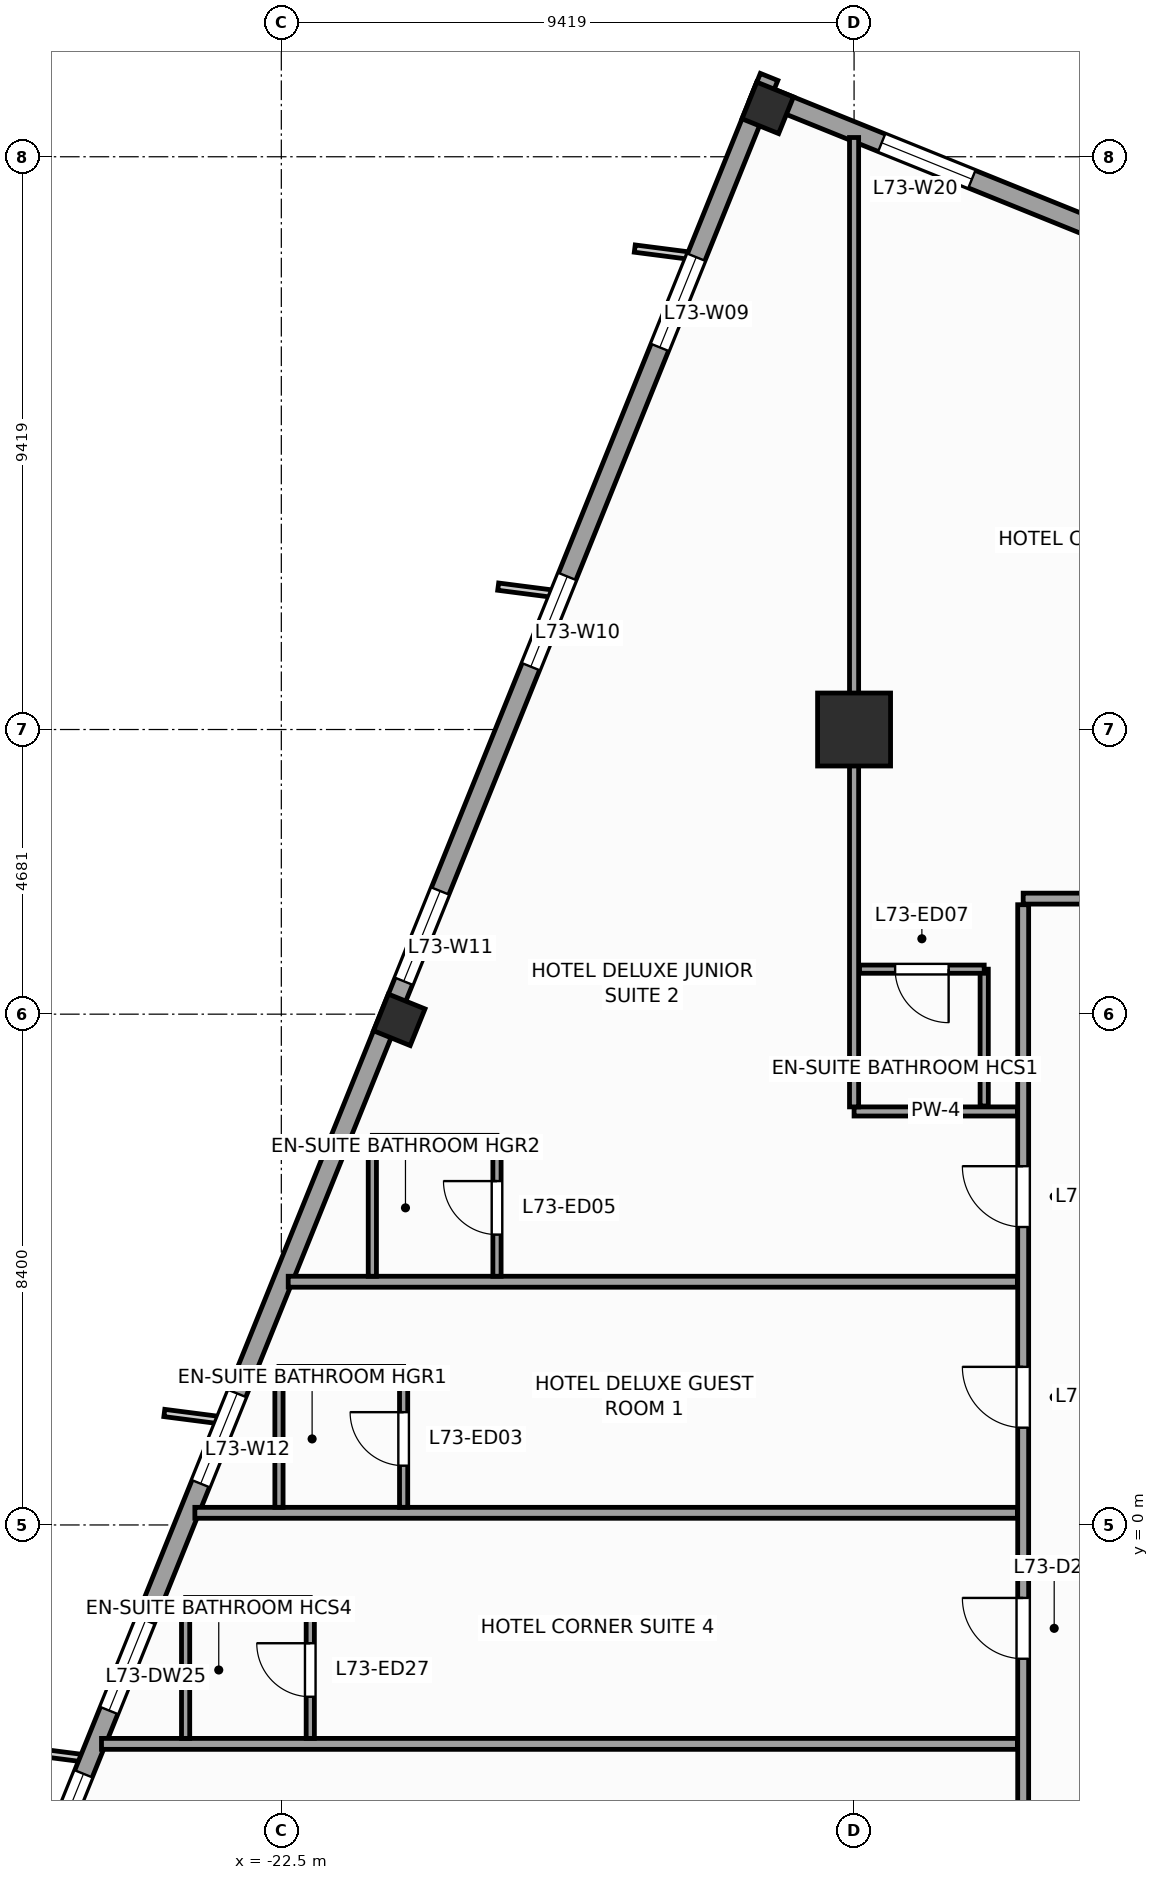
"""IFC4 building model, lengths in metres.
Left out: names, types, materials, properties, quantities, classifications, styles, units other than length and angle.
Written with IfcOpenShell. Run it as: python <this file> out.ifc"""

import sys

from ifc_helpers import new_model, si_unit, direction, frame, frame_2d, origin, origin_2d, place, context, subcontext, project, spatial, rectangle, extrude, source, transform, mapped, element, fill, save


model = new_model("IFC4")
c1 = context("Model", 3, precision=1e-05, world=origin(), true_north=direction((0.0, 1.0)))
c2 = subcontext(c1, "Body", "Model", "MODEL_VIEW")
j1 = project(units=[si_unit("LENGTHUNIT", "METRE"), si_unit("PLANEANGLEUNIT", "RADIAN")], contexts=[c1])
p1 = place(None, origin())
s1 = spatial("IfcSite", under=j1, at=p1, CompositionType="ELEMENT")
p2 = place(p1, origin())
s2 = spatial("IfcBuilding", under=s1, at=p2, CompositionType="ELEMENT")
p3 = place(p2, frame((0.0, 0.0, 297.6)))
s3 = spatial("IfcBuildingStorey", under=s2, at=p3, CompositionType="ELEMENT", Elevation=297.6)
m1 = source(origin(), c2, "Body", "SweptSolid", [
    extrude(rectangle(XDim=1.2, YDim=1.2, at=origin_2d()), origin(), (0.0, 0.0, 1.0), 3.6),
])
p4 = place(p3, frame((-13.081, 13.081, 0.0), z_axis=(0.0, 0.0, 1.0), x_axis=(1.0, 0.0, 0.0)))
e1 = element("IfcColumn", 1, at=p4, inside=s3, PredefinedType="COLUMN", context=c2, shape_type="MappedRepresentation", body=[
    mapped(m1, transform((0.0, 0.0, 0.0), scale=1.0)),
])
m2 = source(origin(), c2, "Body", "SweptSolid", [
    extrude(rectangle(XDim=0.65, YDim=0.65, at=origin_2d()), origin(), (0.0, 0.0, 1.0), 3.6),
])
for number, where, z_axis, x_axis in (
    (2, (-14.501, 23.304, 0.0), (0.0, 0.0, 1.0), (0.375, 0.927, 0.0)),
    (3, (-20.56, 8.307, 0.0), (0.0, 0.0, 1.0), (0.375, 0.927, 0.0)),
):
    element("IfcColumn", number, at=place(p3, frame(where, z_axis=z_axis, x_axis=x_axis)), inside=s3, PredefinedType="COLUMN", context=c2, shape_type="MappedRepresentation", body=[
        mapped(m2, transform((0.0, 0.0, 0.0), scale=1.0)),
    ])
p5 = place(p3, frame((-9.032, 21.278, 0.0), z_axis=(0.0, 0.0, 1.0), x_axis=(-0.927185411764, 0.374602739196, 0.0)))
e4 = element("IfcWall", 4, at=p5, inside=s3, PredefinedType="STANDARD", context=c2, shape_type="SweptSolid", body=[
    extrude(rectangle(XDim=6.155, YDim=0.31, at=frame_2d((3.078, 0.0))), origin(), (0.0, 0.0, 1.0), 3.35),
])
p6 = place(p5, frame((2.278, 0.0, 0.47)))
e5 = element("IfcOpeningElement", 5, at=p6, cuts=e4, PredefinedType="OPENING", context=c2, shape_type="SweptSolid", body=[
    extrude(rectangle(XDim=1.6, YDim=2.1, at=frame_2d((0.8, 1.05))), frame((0.0, 0.165, 0.0), z_axis=(0.0, -1.0, 0.0), x_axis=(1.0, 0.0, 0.0)), (0.0, 0.0, 1.0), 0.33),
])
p7 = place(p3, frame((-14.479, 23.813, 0.0), z_axis=(0.0, 0.0, 1.0), x_axis=(-0.374609557019, -0.927182657188, 0.0)))
e6 = element("IfcWall", 6, at=p7, inside=s3, PredefinedType="STANDARD", context=c2, shape_type="SweptSolid", body=[
    extrude(rectangle(XDim=33.31, YDim=0.31, at=frame_2d((16.655, 0.0))), origin(), (0.0, 0.0, 1.0), 2.75),
])
p8 = place(p7, frame((3.197, 0.0, 0.47)))
e7 = element("IfcOpeningElement", 7, at=p8, cuts=e6, PredefinedType="OPENING", context=c2, shape_type="SweptSolid", body=[
    extrude(rectangle(XDim=1.6, YDim=2.1, at=frame_2d((0.8, 1.05))), frame((0.0, 0.165, 0.0), z_axis=(0.0, -1.0, 0.0), x_axis=(1.0, 0.0, 0.0)), (0.0, 0.0, 1.0), 0.33),
])
p9 = place(p7, frame((8.86, 0.0, 0.47)))
e8 = element("IfcOpeningElement", 8, at=p9, cuts=e6, PredefinedType="OPENING", context=c2, shape_type="SweptSolid", body=[
    extrude(rectangle(XDim=1.6, YDim=2.1, at=frame_2d((0.8, 1.05))), frame((0.0, 0.165, 0.0), z_axis=(0.0, -1.0, 0.0), x_axis=(1.0, 0.0, 0.0)), (0.0, 0.0, 1.0), 0.33),
])
p10 = place(p7, frame((14.439, 0.0, 0.47)))
e9 = element("IfcOpeningElement", 9, at=p10, cuts=e6, PredefinedType="OPENING", context=c2, shape_type="SweptSolid", body=[
    extrude(rectangle(XDim=1.6, YDim=2.1, at=frame_2d((0.8, 1.05))), frame((0.0, 0.165, 0.0), z_axis=(0.0, -1.0, 0.0), x_axis=(1.0, 0.0, 0.0)), (0.0, 0.0, 1.0), 0.33),
])
p11 = place(p7, frame((23.351, 0.0, 0.47)))
e10 = element("IfcOpeningElement", 10, at=p11, cuts=e6, PredefinedType="OPENING", context=c2, shape_type="SweptSolid", body=[
    extrude(rectangle(XDim=1.6, YDim=2.1, at=frame_2d((0.8, 1.05))), frame((0.0, 0.165, 0.0), z_axis=(0.0, -1.0, 0.0), x_axis=(1.0, 0.0, 0.0)), (0.0, 0.0, 1.0), 0.33),
])
p12 = place(p7, frame((30.097, 0.0, 0.47)))
e11 = element("IfcOpeningElement", 11, at=p12, cuts=e6, PredefinedType="OPENING", context=c2, shape_type="SweptSolid", body=[
    extrude(rectangle(XDim=1.6, YDim=2.1, at=frame_2d((0.8, 1.05))), frame((0.0, 0.165, 0.0), z_axis=(0.0, -1.0, 0.0), x_axis=(1.0, 0.0, 0.0)), (0.0, 0.0, 1.0), 0.33),
])
p13 = place(p7, frame((27.374, 0.0, 0.47)))
e12 = element("IfcOpeningElement", 12, at=p13, cuts=e6, PredefinedType="OPENING", context=c2, shape_type="SweptSolid", body=[
    extrude(rectangle(XDim=1.6, YDim=2.1, at=frame_2d((0.8, 1.05))), frame((0.0, 0.165, 0.0), z_axis=(0.0, -1.0, 0.0), x_axis=(1.0, 0.0, 0.0)), (0.0, 0.0, 1.0), 0.33),
])
p14 = place(p3, frame((-10.3, 10.3, 0.0), z_axis=(0.0, 0.0, 1.0), x_axis=(1.0, 0.0, 0.0)))
e13 = element("IfcWall", 13, at=p14, inside=s3, PredefinedType="PARTITIONING", context=c2, shape_type="SweptSolid", body=[
    extrude(rectangle(XDim=21.65, YDim=0.18, at=frame_2d((10.825, 0.0))), origin(), (0.0, 0.0, 1.0), 3.35),
])
p15 = place(p14, frame((2.564, 0.0, 0.0)))
e14 = element("IfcOpeningElement", 14, at=p15, cuts=e13, PredefinedType="OPENING", context=c2, shape_type="SweptSolid", body=[
    extrude(rectangle(XDim=1.0, YDim=2.15, at=frame_2d((0.5, 1.075))), frame((0.0, 0.1, 0.0), z_axis=(0.0, -1.0, 0.0), x_axis=(1.0, 0.0, 0.0)), (0.0, 0.0, 1.0), 0.2),
])
p16 = place(p14, frame((8.05, 0.0, 0.0)))
e15 = element("IfcOpeningElement", 15, at=p16, cuts=e13, PredefinedType="OPENING", context=c2, shape_type="SweptSolid", body=[
    extrude(rectangle(XDim=1.0, YDim=2.15, at=frame_2d((0.5, 1.075))), frame((0.0, 0.1, 0.0), z_axis=(0.0, -1.0, 0.0), x_axis=(1.0, 0.0, 0.0)), (0.0, 0.0, 1.0), 0.2),
])
p17 = place(p14, frame((12.54, 0.0, 0.0)))
e16 = element("IfcOpeningElement", 16, at=p17, cuts=e13, PredefinedType="OPENING", context=c2, shape_type="SweptSolid", body=[
    extrude(rectangle(XDim=1.0, YDim=2.15, at=frame_2d((0.5, 1.075))), frame((0.0, 0.1, 0.0), z_axis=(0.0, -1.0, 0.0), x_axis=(1.0, 0.0, 0.0)), (0.0, 0.0, 1.0), 0.2),
])
p18 = place(p14, frame((18.871, 0.0, 0.0)))
e17 = element("IfcOpeningElement", 17, at=p18, cuts=e13, PredefinedType="OPENING", context=c2, shape_type="SweptSolid", body=[
    extrude(rectangle(XDim=1.0, YDim=2.15, at=frame_2d((0.5, 1.075))), frame((0.0, 0.1, 0.0), z_axis=(0.0, -1.0, 0.0), x_axis=(1.0, 0.0, 0.0)), (0.0, 0.0, 1.0), 0.2),
])
p19 = place(p3, frame((-10.3, -12.35, 0.0), z_axis=(0.0, 0.0, 1.0), x_axis=(0.0, 1.0, 0.0)))
e18 = element("IfcWall", 18, at=p19, inside=s3, PredefinedType="PARTITIONING", context=c2, shape_type="SweptSolid", body=[
    extrude(rectangle(XDim=22.55, YDim=0.18, at=frame_2d((11.275, 0.0))), origin(), (0.0, 0.0, 1.0), 3.35),
])
p20 = place(p19, frame((13.95, 0.0, 0.0)))
e19 = element("IfcOpeningElement", 19, at=p20, cuts=e18, PredefinedType="OPENING", context=c2, shape_type="SweptSolid", body=[
    extrude(rectangle(XDim=1.0, YDim=2.15, at=frame_2d((0.5, 1.075))), frame((0.0, 0.1, 0.0), z_axis=(0.0, -1.0, 0.0), x_axis=(1.0, 0.0, 0.0)), (0.0, 0.0, 1.0), 0.2),
])
p21 = place(p19, frame((17.25, 0.0, 0.0)))
e20 = element("IfcOpeningElement", 20, at=p21, cuts=e18, PredefinedType="OPENING", context=c2, shape_type="SweptSolid", body=[
    extrude(rectangle(XDim=1.0, YDim=2.15, at=frame_2d((0.5, 1.075))), frame((0.0, 0.1, 0.0), z_axis=(0.0, -1.0, 0.0), x_axis=(1.0, 0.0, 0.0)), (0.0, 0.0, 1.0), 0.2),
])
p22 = place(p19, frame((6.65, 0.0, 0.0)))
e21 = element("IfcOpeningElement", 21, at=p22, cuts=e18, PredefinedType="OPENING", context=c2, shape_type="SweptSolid", body=[
    extrude(rectangle(XDim=1.0, YDim=2.15, at=frame_2d((0.5, 1.075))), frame((0.0, 0.1, 0.0), z_axis=(0.0, -1.0, 0.0), x_axis=(1.0, 0.0, 0.0)), (0.0, 0.0, 1.0), 0.2),
])
p23 = place(p19, frame((10.15, 0.0, 0.0)))
e22 = element("IfcOpeningElement", 22, at=p23, cuts=e18, PredefinedType="OPENING", context=c2, shape_type="SweptSolid", body=[
    extrude(rectangle(XDim=1.0, YDim=2.15, at=frame_2d((0.5, 1.075))), frame((0.0, 0.1, 0.0), z_axis=(0.0, -1.0, 0.0), x_axis=(1.0, 0.0, 0.0)), (0.0, 0.0, 1.0), 0.2),
])
p24 = place(p3, frame((-10.395, -3.6, 0.0), z_axis=(0.0, 0.0, 1.0), x_axis=(-1.0, 0.0, 0.0)))
e23 = element("IfcWall", 23, at=p24, inside=s3, PredefinedType="PARTITIONING", context=c2, shape_type="SweptSolid", body=[
    extrude(rectangle(XDim=15.062, YDim=0.18, at=frame_2d((7.531, 0.0))), origin(), (0.0, 0.0, 1.0), 3.02),
])
p25 = place(p3, frame((-10.395, 0.2, 0.0), z_axis=(0.0, 0.0, 1.0), x_axis=(-1.0, 0.0, 0.0)))
e24 = element("IfcWall", 24, at=p25, inside=s3, PredefinedType="PARTITIONING", context=c2, shape_type="SweptSolid", body=[
    extrude(rectangle(XDim=13.527, YDim=0.18, at=frame_2d((6.763, 0.0))), origin(), (0.0, 0.0, 1.0), 3.02),
])
p26 = place(p3, frame((-10.395, 4.0, 0.0), z_axis=(0.0, 0.0, 1.0), x_axis=(-1.0, 0.0, 0.0)))
e25 = element("IfcWall", 25, at=p26, inside=s3, PredefinedType="PARTITIONING", context=c2, shape_type="SweptSolid", body=[
    extrude(rectangle(XDim=11.992, YDim=0.18, at=frame_2d((5.996, 0.0))), origin(), (0.0, 0.0, 1.0), 3.02),
])
p27 = place(p3, frame((-10.395, 6.8, 0.0), z_axis=(0.0, 0.0, 1.0), x_axis=(-1.0, 0.0, 0.0)))
e26 = element("IfcWall", 26, at=p27, inside=s3, PredefinedType="PARTITIONING", context=c2, shape_type="SweptSolid", body=[
    extrude(rectangle(XDim=2.686, YDim=0.15, at=frame_2d((1.343, 0.0))), origin(), (0.0, 0.0, 1.0), 3.35),
])
p28 = place(p3, frame((-13.081, 6.875, 0.0), z_axis=(0.0, 0.0, 1.0), x_axis=(0.0, 1.0, 0.0)))
e27 = element("IfcWall", 27, at=p28, inside=s3, PredefinedType="PARTITIONING", context=c2, shape_type="SweptSolid", body=[
    extrude(rectangle(XDim=15.942, YDim=0.15, at=frame_2d((7.971, 0.0))), origin(), (0.0, 0.0, 1.0), 2.45),
])
p29 = place(p3, frame((-20.489, 0.29, 0.0), z_axis=(0.0, 0.0, 1.0), x_axis=(0.0, 1.0, 0.0)))
e28 = element("IfcWall", 28, at=p29, inside=s3, PredefinedType="PARTITIONING", context=c2, shape_type="SweptSolid", body=[
    extrude(rectangle(XDim=2.25, YDim=0.135, at=frame_2d((1.125, 0.0))), origin(), (0.0, 0.0, 1.0), 3.35),
])
p30 = place(p29, frame((0.685, 0.0, 0.0)))
e29 = element("IfcOpeningElement", 29, at=p30, cuts=e28, PredefinedType="OPENING", context=c2, shape_type="SweptSolid", body=[
    extrude(rectangle(XDim=0.88, YDim=2.1, at=frame_2d((0.44, 1.05))), frame((0.0, 0.078, 0.0), z_axis=(0.0, -1.0, 0.0), x_axis=(1.0, 0.0, 0.0)), (0.0, 0.0, 1.0), 0.155),
])
p31 = place(p3, frame((-22.539, 2.54, 0.0), z_axis=(0.0, 0.0, 1.0), x_axis=(1.0, 0.0, 0.0)))
e30 = element("IfcWall", 30, at=p31, inside=s3, PredefinedType="PARTITIONING", context=c2, shape_type="SweptSolid", body=[
    extrude(rectangle(XDim=2.05, YDim=0.135, at=frame_2d((1.025, 0.0))), origin(), (0.0, 0.0, 1.0), 3.35),
])
p32 = place(p3, frame((-22.539, 0.29, 0.0), z_axis=(0.0, 0.0, 1.0), x_axis=(0.0, 1.0, 0.0)))
e31 = element("IfcWall", 31, at=p32, inside=s3, PredefinedType="PARTITIONING", context=c2, shape_type="SweptSolid", body=[
    extrude(rectangle(XDim=2.25, YDim=0.135, at=frame_2d((1.125, 0.0))), origin(), (0.0, 0.0, 1.0), 3.35),
])
p33 = place(p3, frame((-18.953, 4.09, 0.0), z_axis=(0.0, 0.0, 1.0), x_axis=(0.0, 1.0, 0.0)))
e32 = element("IfcWall", 32, at=p33, inside=s3, PredefinedType="PARTITIONING", context=c2, shape_type="SweptSolid", body=[
    extrude(rectangle(XDim=2.25, YDim=0.135, at=frame_2d((1.125, 0.0))), origin(), (0.0, 0.0, 1.0), 3.35),
])
p34 = place(p33, frame((0.685, 0.0, 0.0)))
e33 = element("IfcOpeningElement", 33, at=p34, cuts=e32, PredefinedType="OPENING", context=c2, shape_type="SweptSolid", body=[
    extrude(rectangle(XDim=0.88, YDim=2.1, at=frame_2d((0.44, 1.05))), frame((0.0, 0.078, 0.0), z_axis=(0.0, -1.0, 0.0), x_axis=(1.0, 0.0, 0.0)), (0.0, 0.0, 1.0), 0.155),
])
p35 = place(p3, frame((-21.003, 6.34, 0.0), z_axis=(0.0, 0.0, 1.0), x_axis=(1.0, 0.0, 0.0)))
e34 = element("IfcWall", 34, at=p35, inside=s3, PredefinedType="PARTITIONING", context=c2, shape_type="SweptSolid", body=[
    extrude(rectangle(XDim=2.05, YDim=0.135, at=frame_2d((1.025, 0.0))), origin(), (0.0, 0.0, 1.0), 3.35),
])
for number, where, z_axis, x_axis in (
    (35, (-21.003, 4.09, 0.0), (0.0, 0.0, 1.0), (0.0, 1.0, 0.0)),
    (36, (-10.941, 6.89, 0.0), (0.0, 0.0, 1.0), (0.0, 1.0, 0.0)),
):
    element("IfcWall", number, at=place(p3, frame(where, z_axis=z_axis, x_axis=x_axis)), inside=s3, PredefinedType="PARTITIONING", context=c2, shape_type="SweptSolid", body=[
        extrude(rectangle(XDim=2.25, YDim=0.135, at=frame_2d((1.125, 0.0))), origin(), (0.0, 0.0, 1.0), 3.35),
    ])
p36 = place(p3, frame((-12.991, 9.14, 0.0), z_axis=(0.0, 0.0, 1.0), x_axis=(1.0, 0.0, 0.0)))
e37 = element("IfcWall", 37, at=p36, inside=s3, PredefinedType="PARTITIONING", context=c2, shape_type="SweptSolid", body=[
    extrude(rectangle(XDim=2.05, YDim=0.135, at=frame_2d((1.025, 0.0))), origin(), (0.0, 0.0, 1.0), 3.35),
])
p37 = place(p36, frame((0.585, 0.0, 0.0)))
e38 = element("IfcOpeningElement", 38, at=p37, cuts=e37, PredefinedType="OPENING", context=c2, shape_type="SweptSolid", body=[
    extrude(rectangle(XDim=0.88, YDim=2.1, at=frame_2d((0.44, 1.05))), frame((0.0, 0.078, 0.0), z_axis=(0.0, -1.0, 0.0), x_axis=(1.0, 0.0, 0.0)), (0.0, 0.0, 1.0), 0.155),
])
p38 = place(p3, frame((-22.024, -3.51, 0.0), z_axis=(0.0, 0.0, 1.0), x_axis=(0.0, 1.0, 0.0)))
e39 = element("IfcWall", 39, at=p38, inside=s3, PredefinedType="PARTITIONING", context=c2, shape_type="SweptSolid", body=[
    extrude(rectangle(XDim=2.25, YDim=0.135, at=frame_2d((1.125, 0.0))), origin(), (0.0, 0.0, 1.0), 3.35),
])
p39 = place(p38, frame((0.685, 0.0, 0.0)))
e40 = element("IfcOpeningElement", 40, at=p39, cuts=e39, PredefinedType="OPENING", context=c2, shape_type="SweptSolid", body=[
    extrude(rectangle(XDim=0.88, YDim=2.1, at=frame_2d((0.44, 1.05))), frame((0.0, 0.078, 0.0), z_axis=(0.0, -1.0, 0.0), x_axis=(1.0, 0.0, 0.0)), (0.0, 0.0, 1.0), 0.155),
])
p40 = place(p3, frame((-24.074, -1.26, 0.0), z_axis=(0.0, 0.0, 1.0), x_axis=(1.0, 0.0, 0.0)))
e41 = element("IfcWall", 41, at=p40, inside=s3, PredefinedType="PARTITIONING", context=c2, shape_type="SweptSolid", body=[
    extrude(rectangle(XDim=2.05, YDim=0.135, at=frame_2d((1.025, 0.0))), origin(), (0.0, 0.0, 1.0), 3.35),
])
p41 = place(p3, frame((-24.074, -3.51, 0.0), z_axis=(0.0, 0.0, 1.0), x_axis=(0.0, 1.0, 0.0)))
e42 = element("IfcWall", 42, at=p41, inside=s3, PredefinedType="PARTITIONING", context=c2, shape_type="SweptSolid", body=[
    extrude(rectangle(XDim=2.25, YDim=0.135, at=frame_2d((1.125, 0.0))), origin(), (0.0, 0.0, 1.0), 3.35),
])
m3 = source(origin(), c2, "Body", "SweptSolid", [
    extrude(rectangle(XDim=1.6, YDim=2.1, at=frame_2d((0.8, 1.05))), frame((0.0, 0.03, 0.0), z_axis=(0.0, -1.0, 0.0), x_axis=(1.0, 0.0, 0.0)), (0.0, 0.0, 1.0), 0.06),
])
p42 = place(p8, origin())
e43 = element("IfcWindow", 43, at=p42, inside=s3, PartitioningType="SINGLE_PANEL", PredefinedType="WINDOW", context=c2, shape_type="MappedRepresentation", body=[
    mapped(m3, transform((0.0, 0.0, 0.0), scale=1.0)),
])
fill(e7, e43)
p43 = place(p9, origin())
e44 = element("IfcWindow", 44, at=p43, inside=s3, PartitioningType="SINGLE_PANEL", PredefinedType="WINDOW", context=c2, shape_type="MappedRepresentation", body=[
    mapped(m3, transform((0.0, 0.0, 0.0), scale=1.0)),
])
fill(e8, e44)
p44 = place(p10, origin())
e45 = element("IfcWindow", 45, at=p44, inside=s3, PartitioningType="SINGLE_PANEL", PredefinedType="WINDOW", context=c2, shape_type="MappedRepresentation", body=[
    mapped(m3, transform((0.0, 0.0, 0.0), scale=1.0)),
])
fill(e9, e45)
p45 = place(p11, origin())
e46 = element("IfcWindow", 46, at=p45, inside=s3, PartitioningType="SINGLE_PANEL", PredefinedType="WINDOW", context=c2, shape_type="MappedRepresentation", body=[
    mapped(m3, transform((0.0, 0.0, 0.0), scale=1.0)),
])
fill(e10, e46)
p46 = place(p12, origin())
e47 = element("IfcWindow", 47, at=p46, inside=s3, PartitioningType="SINGLE_PANEL", PredefinedType="WINDOW", context=c2, shape_type="MappedRepresentation", body=[
    mapped(m3, transform((0.0, 0.0, 0.0), scale=1.0)),
])
fill(e11, e47)
p47 = place(p6, origin())
e48 = element("IfcWindow", 48, at=p47, inside=s3, PartitioningType="SINGLE_PANEL", PredefinedType="WINDOW", context=c2, shape_type="MappedRepresentation", body=[
    mapped(m3, transform((0.0, 0.0, 0.0), scale=1.0)),
])
fill(e5, e48)
m4 = source(origin(), c2, "Body", "SweptSolid", [
    extrude(rectangle(XDim=1.0, YDim=2.15, at=frame_2d((0.5, 1.075))), frame((0.0, 0.025, 0.0), z_axis=(0.0, -1.0, 0.0), x_axis=(1.0, 0.0, 0.0)), (0.0, 0.0, 1.0), 0.05),
])
p48 = place(p20, origin())
e49 = element("IfcDoor", 49, at=p48, inside=s3, OperationType="SINGLE_SWING_RIGHT", PredefinedType="DOOR", context=c2, shape_type="MappedRepresentation", body=[
    mapped(m4, transform((0.0, 0.0, 0.0), scale=1.0)),
])
fill(e19, e49)
m5 = source(origin(), c2, "Body", "SweptSolid", [
    extrude(rectangle(XDim=0.88, YDim=2.1, at=frame_2d((0.44, 1.05))), frame((0.0, 0.025, 0.0), z_axis=(0.0, -1.0, 0.0), x_axis=(1.0, 0.0, 0.0)), (0.0, 0.0, 1.0), 0.05),
])
p49 = place(p30, origin())
e50 = element("IfcDoor", 50, at=p49, inside=s3, OperationType="SINGLE_SWING_RIGHT", PredefinedType="DOOR", context=c2, shape_type="MappedRepresentation", body=[
    mapped(m5, transform((0.0, 0.0, 0.0), scale=1.0)),
])
fill(e29, e50)
p50 = place(p21, origin())
e51 = element("IfcDoor", 51, at=p50, inside=s3, OperationType="SINGLE_SWING_RIGHT", PredefinedType="DOOR", context=c2, shape_type="MappedRepresentation", body=[
    mapped(m4, transform((0.0, 0.0, 0.0), scale=1.0)),
])
fill(e20, e51)
p51 = place(p34, origin())
e52 = element("IfcDoor", 52, at=p51, inside=s3, OperationType="SINGLE_SWING_RIGHT", PredefinedType="DOOR", context=c2, shape_type="MappedRepresentation", body=[
    mapped(m5, transform((0.0, 0.0, 0.0), scale=1.0)),
])
fill(e33, e52)
p52 = place(p37, frame((0.88, 0.0, 0.0), z_axis=(0.0, 0.0, 1.0), x_axis=(-1.0, 0.0, 0.0)))
e53 = element("IfcDoor", 53, at=p52, inside=s3, OperationType="SINGLE_SWING_RIGHT", PredefinedType="DOOR", context=c2, shape_type="MappedRepresentation", body=[
    mapped(m5, transform((0.0, 0.0, 0.0), scale=1.0)),
])
fill(e38, e53)
p53 = place(p23, origin())
e54 = element("IfcDoor", 54, at=p53, inside=s3, OperationType="SINGLE_SWING_RIGHT", PredefinedType="DOOR", context=c2, shape_type="MappedRepresentation", body=[
    mapped(m4, transform((0.0, 0.0, 0.0), scale=1.0)),
])
fill(e22, e54)
p54 = place(p39, origin())
e55 = element("IfcDoor", 55, at=p54, inside=s3, OperationType="SINGLE_SWING_RIGHT", PredefinedType="DOOR", context=c2, shape_type="MappedRepresentation", body=[
    mapped(m5, transform((0.0, 0.0, 0.0), scale=1.0)),
])
fill(e40, e55)
p55 = place(p13, origin())
e56 = element("IfcWindow", 56, at=p55, inside=s3, PartitioningType="SINGLE_PANEL", PredefinedType="WINDOW", context=c2, shape_type="MappedRepresentation", body=[
    mapped(m3, transform((0.0, 0.0, 0.0), scale=1.0)),
])
fill(e12, e56)
save(model, sys.argv[1])
